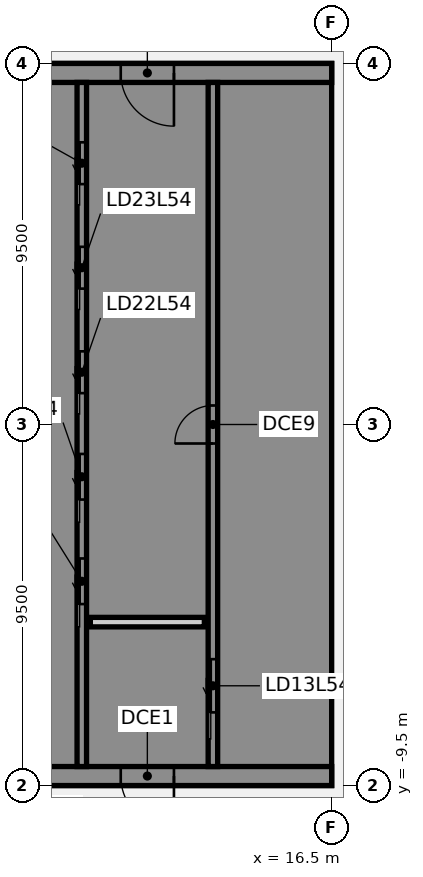
"""IFC4 building model, lengths in metres.
Left out: names, types, materials, properties, quantities, classifications, styles, units other than length and angle.
Written with IfcOpenShell. Run it as: python <this file> out.ifc"""

import sys

from ifc_helpers import new_model, si_unit, direction, frame, frame_2d, origin, place, context, subcontext, project, spatial, polyline, rectangle, outline, extrude, element, fill, save


model = new_model("IFC4")
c1 = context("Model", 3, precision=1e-05, world=origin(), true_north=direction((0.0, 1.0)))
c2 = subcontext(c1, "Body", "Model", "MODEL_VIEW")
j1 = project(units=[si_unit("LENGTHUNIT", "METRE"), si_unit("PLANEANGLEUNIT", "RADIAN")], contexts=[c1])
p1 = place(None, origin())
s1 = spatial("IfcSite", under=j1, at=p1, CompositionType="ELEMENT")
p2 = place(p1, origin())
s2 = spatial("IfcBuilding", under=s1, at=p2, CompositionType="ELEMENT")
p3 = place(p2, frame((0.0, 0.0, 214.9)))
s3 = spatial("IfcBuildingStorey", under=s2, at=p3, CompositionType="ELEMENT", Elevation=214.9)
p4 = place(p3, frame((16.5, -9.25, 0.0), z_axis=(0.0, 0.0, 1.0), x_axis=(-1.0, 0.0, 0.0)))
e1 = element("IfcWall", 1, at=p4, inside=s3, PredefinedType="SHEAR", context=c2, shape_type="SweptSolid", body=[
    extrude(rectangle(XDim=13.0, YDim=0.5, at=frame_2d((6.5, 0.0))), origin(), (0.0, 0.0, 1.0), 4.86),
])
p5 = place(p4, frame((4.15, 0.0, 0.0)))
e2 = element("IfcOpeningElement", 2, at=p5, cuts=e1, PredefinedType="OPENING", context=c2, shape_type="SweptSolid", body=[
    extrude(rectangle(XDim=1.4, YDim=2.1, at=frame_2d((0.7, 1.05))), frame((0.0, 0.26, 0.0), z_axis=(0.0, -1.0, 0.0), x_axis=(1.0, 0.0, 0.0)), (0.0, 0.0, 1.0), 0.52),
])
p6 = place(p4, frame((10.125, 0.0, 0.0)))
e3 = element("IfcOpeningElement", 3, at=p6, cuts=e1, PredefinedType="OPENING", context=c2, shape_type="SweptSolid", body=[
    extrude(rectangle(XDim=1.4, YDim=2.1, at=frame_2d((0.7, 1.05))), frame((0.0, 0.26, 0.0), z_axis=(0.0, -1.0, 0.0), x_axis=(1.0, 0.0, 0.0)), (0.0, 0.0, 1.0), 0.52),
])
p7 = place(p3, origin())
e4 = element("IfcWall", 4, at=p7, inside=s3, PredefinedType="SHEAR", context=c2, shape_type="SweptSolid", body=[
    extrude(outline(polyline([(13.5, -8.125), (13.5, -9.0), (16.0, -9.0), (16.5, -9.0), (16.5, 9.0), (16.0, 9.0), (13.5, 9.0), (13.5, 8.125), (16.0, 8.125), (16.0, 5.625), (13.5, 5.625), (13.5, 5.375), (16.0, 5.375), (16.0, -5.375), (13.5, -5.375), (13.5, -5.625), (16.0, -5.625), (16.0, -8.125), (13.5, -8.125)])), origin(), (0.0, 0.0, 1.0), 4.86),
])
p8 = place(p3, frame((16.5, 9.25, 0.0), z_axis=(0.0, 0.0, 1.0), x_axis=(-1.0, 0.0, 0.0)))
e5 = element("IfcWall", 5, at=p8, inside=s3, PredefinedType="SHEAR", context=c2, shape_type="SweptSolid", body=[
    extrude(rectangle(XDim=13.0, YDim=0.5, at=frame_2d((6.5, 0.0))), origin(), (0.0, 0.0, 1.0), 4.86),
])
p9 = place(p8, frame((4.15, 0.0, 0.0)))
e6 = element("IfcOpeningElement", 6, at=p9, cuts=e5, PredefinedType="OPENING", context=c2, shape_type="SweptSolid", body=[
    extrude(rectangle(XDim=1.4, YDim=2.1, at=frame_2d((0.7, 1.05))), frame((0.0, 0.26, 0.0), z_axis=(0.0, -1.0, 0.0), x_axis=(1.0, 0.0, 0.0)), (0.0, 0.0, 1.0), 0.52),
])
p10 = place(p3, origin())
e7 = element("IfcWall", 7, at=p10, inside=s3, PredefinedType="SHEAR", context=c2, shape_type="SweptSolid", body=[
    extrude(outline(polyline([(9.8, -5.375), (7.5, -5.375), (7.5, -2.875), (9.8, -2.875), (9.8, -2.625), (7.5, -2.625), (7.5, -0.125), (9.8, -0.125), (9.8, 0.125), (7.5, 0.125), (7.5, 2.625), (9.8, 2.625), (9.8, 2.875), (7.5, 2.875), (7.5, 5.375), (9.8, 5.375), (9.8, 5.625), (7.5, 5.625), (7.5, 8.125), (9.8, 8.125), (9.8, 9.0), (7.5, 9.0), (7.25, 9.0), (7.25, -5.625), (7.5, -5.625), (9.8, -5.625), (9.8, -5.375)])), origin(), (0.0, 0.0, 1.0), 4.86),
])
p11 = place(p3, origin())
e8 = element("IfcWall", 8, at=p11, inside=s3, PredefinedType="SHEAR", context=c2, shape_type="SweptSolid", body=[
    extrude(outline(polyline([(7.5, -8.125), (7.5, -9.0), (9.8, -9.0), (9.8, -8.125), (9.8, -5.625), (9.55, -5.625), (9.55, -8.125), (7.5, -8.125)])), origin(), (0.0, 0.0, 1.0), 4.86),
])
p12 = place(p3, frame((13.375, -9.0, 0.0), z_axis=(0.0, 0.0, 1.0), x_axis=(0.0, 1.0, 0.0)))
e9 = element("IfcWall", 9, at=p12, inside=s3, PredefinedType="SHEAR", context=c2, shape_type="SweptSolid", body=[
    extrude(rectangle(XDim=18.0, YDim=0.25, at=frame_2d((9.0, 0.0))), origin(), (0.0, 0.0, 1.0), 4.86),
])
p13 = place(p12, frame((1.425, 0.0, 0.0)))
e10 = element("IfcOpeningElement", 10, at=p13, cuts=e9, PredefinedType="OPENING", context=c2, shape_type="SweptSolid", body=[
    extrude(rectangle(XDim=1.4, YDim=2.1, at=frame_2d((0.7, 1.05))), frame((0.0, 0.135, 0.0), z_axis=(0.0, -1.0, 0.0), x_axis=(1.0, 0.0, 0.0)), (0.0, 0.0, 1.0), 0.27),
])
p14 = place(p12, frame((8.5, 0.0, 0.0)))
e11 = element("IfcOpeningElement", 11, at=p14, cuts=e9, PredefinedType="OPENING", context=c2, shape_type="SweptSolid", body=[
    extrude(rectangle(XDim=1.0, YDim=2.1, at=frame_2d((0.5, 1.05))), frame((0.0, 0.135, 0.0), z_axis=(0.0, -1.0, 0.0), x_axis=(1.0, 0.0, 0.0)), (0.0, 0.0, 1.0), 0.27),
])
p15 = place(p3, frame((9.925, -9.0, 0.0), z_axis=(0.0, 0.0, 1.0), x_axis=(0.0, 1.0, 0.0)))
e12 = element("IfcWall", 12, at=p15, inside=s3, PredefinedType="SHEAR", context=c2, shape_type="SweptSolid", body=[
    extrude(rectangle(XDim=18.0, YDim=0.25, at=frame_2d((9.0, 0.0))), origin(), (0.0, 0.0, 1.0), 4.86),
])
p16 = place(p15, frame((4.275, 0.0, 0.0)))
e13 = element("IfcOpeningElement", 13, at=p16, cuts=e12, PredefinedType="OPENING", context=c2, shape_type="SweptSolid", body=[
    extrude(rectangle(XDim=1.2, YDim=2.1, at=frame_2d((0.6, 1.05))), frame((0.0, 0.135, 0.0), z_axis=(0.0, -1.0, 0.0), x_axis=(1.0, 0.0, 0.0)), (0.0, 0.0, 1.0), 0.27),
])
p17 = place(p15, frame((7.025, 0.0, 0.0)))
e14 = element("IfcOpeningElement", 14, at=p17, cuts=e12, PredefinedType="OPENING", context=c2, shape_type="SweptSolid", body=[
    extrude(rectangle(XDim=1.2, YDim=2.1, at=frame_2d((0.6, 1.05))), frame((0.0, 0.135, 0.0), z_axis=(0.0, -1.0, 0.0), x_axis=(1.0, 0.0, 0.0)), (0.0, 0.0, 1.0), 0.27),
])
p18 = place(p15, frame((9.825, 0.0, 0.0)))
e15 = element("IfcOpeningElement", 15, at=p18, cuts=e12, PredefinedType="OPENING", context=c2, shape_type="SweptSolid", body=[
    extrude(rectangle(XDim=1.1, YDim=2.1, at=frame_2d((0.55, 1.05))), frame((0.0, 0.135, 0.0), z_axis=(0.0, -1.0, 0.0), x_axis=(1.0, 0.0, 0.0)), (0.0, 0.0, 1.0), 0.27),
])
p19 = place(p15, frame((12.575, 0.0, 0.0)))
e16 = element("IfcOpeningElement", 16, at=p19, cuts=e12, PredefinedType="OPENING", context=c2, shape_type="SweptSolid", body=[
    extrude(rectangle(XDim=1.1, YDim=2.1, at=frame_2d((0.55, 1.05))), frame((0.0, 0.135, 0.0), z_axis=(0.0, -1.0, 0.0), x_axis=(1.0, 0.0, 0.0)), (0.0, 0.0, 1.0), 0.27),
])
p20 = place(p15, frame((15.325, 0.0, 0.0)))
e17 = element("IfcOpeningElement", 17, at=p20, cuts=e12, PredefinedType="OPENING", context=c2, shape_type="SweptSolid", body=[
    extrude(rectangle(XDim=1.1, YDim=2.1, at=frame_2d((0.55, 1.05))), frame((0.0, 0.135, 0.0), z_axis=(0.0, -1.0, 0.0), x_axis=(1.0, 0.0, 0.0)), (0.0, 0.0, 1.0), 0.27),
])
p21 = place(p3, frame((13.15, -5.2, 0.0), z_axis=(0.0, 0.0, 1.0), x_axis=(-1.0, 0.0, 0.0)))
e18 = element("IfcWall", 18, at=p21, inside=s3, PredefinedType="PARTITIONING", context=c2, shape_type="SweptSolid", body=[
    extrude(rectangle(XDim=3.0, YDim=0.25, at=frame_2d((1.5, 0.0))), origin(), (0.0, 0.0, 1.0), 4.86),
])
p22 = place(p5, origin())
e19 = element("IfcDoor", 19, at=p22, inside=s3, OperationType="SINGLE_SWING_LEFT", PredefinedType="DOOR", context=c2, shape_type="SweptSolid", body=[
    extrude(rectangle(XDim=1.4, YDim=2.1, at=frame_2d((0.7, 1.05))), frame((0.0, 0.025, 0.0), z_axis=(0.0, -1.0, 0.0), x_axis=(1.0, 0.0, 0.0)), (0.0, 0.0, 1.0), 0.05),
])
fill(e2, e19)
p23 = place(p13, origin())
e20 = element("IfcDoor", 20, at=p23, inside=s3, OperationType="SLIDING_TO_LEFT", PredefinedType="DOOR", context=c2, shape_type="SweptSolid", body=[
    extrude(rectangle(XDim=1.4, YDim=2.1, at=frame_2d((0.7, 1.05))), frame((0.0, 0.025, 0.0), z_axis=(0.0, -1.0, 0.0), x_axis=(1.0, 0.0, 0.0)), (0.0, 0.0, 1.0), 0.05),
])
fill(e10, e20)
p24 = place(p16, origin())
e21 = element("IfcDoor", 21, at=p24, inside=s3, OperationType="SLIDING_TO_LEFT", PredefinedType="DOOR", context=c2, shape_type="SweptSolid", body=[
    extrude(rectangle(XDim=1.2, YDim=2.1, at=frame_2d((0.6, 1.05))), frame((0.0, 0.025, 0.0), z_axis=(0.0, -1.0, 0.0), x_axis=(1.0, 0.0, 0.0)), (0.0, 0.0, 1.0), 0.05),
])
fill(e13, e21)
p25 = place(p17, origin())
e22 = element("IfcDoor", 22, at=p25, inside=s3, OperationType="SLIDING_TO_LEFT", PredefinedType="DOOR", context=c2, shape_type="SweptSolid", body=[
    extrude(rectangle(XDim=1.2, YDim=2.1, at=frame_2d((0.6, 1.05))), frame((0.0, 0.025, 0.0), z_axis=(0.0, -1.0, 0.0), x_axis=(1.0, 0.0, 0.0)), (0.0, 0.0, 1.0), 0.05),
])
fill(e14, e22)
p26 = place(p18, origin())
e23 = element("IfcDoor", 23, at=p26, inside=s3, OperationType="SLIDING_TO_LEFT", PredefinedType="DOOR", context=c2, shape_type="SweptSolid", body=[
    extrude(rectangle(XDim=1.1, YDim=2.1, at=frame_2d((0.55, 1.05))), frame((0.0, 0.025, 0.0), z_axis=(0.0, -1.0, 0.0), x_axis=(1.0, 0.0, 0.0)), (0.0, 0.0, 1.0), 0.05),
])
fill(e15, e23)
p27 = place(p19, origin())
e24 = element("IfcDoor", 24, at=p27, inside=s3, OperationType="SLIDING_TO_LEFT", PredefinedType="DOOR", context=c2, shape_type="SweptSolid", body=[
    extrude(rectangle(XDim=1.1, YDim=2.1, at=frame_2d((0.55, 1.05))), frame((0.0, 0.025, 0.0), z_axis=(0.0, -1.0, 0.0), x_axis=(1.0, 0.0, 0.0)), (0.0, 0.0, 1.0), 0.05),
])
fill(e16, e24)
p28 = place(p20, origin())
e25 = element("IfcDoor", 25, at=p28, inside=s3, OperationType="SLIDING_TO_LEFT", PredefinedType="DOOR", context=c2, shape_type="SweptSolid", body=[
    extrude(rectangle(XDim=1.1, YDim=2.1, at=frame_2d((0.55, 1.05))), frame((0.0, 0.025, 0.0), z_axis=(0.0, -1.0, 0.0), x_axis=(1.0, 0.0, 0.0)), (0.0, 0.0, 1.0), 0.05),
])
fill(e17, e25)
p29 = place(p9, origin())
e26 = element("IfcDoor", 26, at=p29, inside=s3, OperationType="SINGLE_SWING_LEFT", PredefinedType="DOOR", context=c2, shape_type="SweptSolid", body=[
    extrude(rectangle(XDim=1.4, YDim=2.1, at=frame_2d((0.7, 1.05))), frame((0.0, 0.025, 0.0), z_axis=(0.0, -1.0, 0.0), x_axis=(1.0, 0.0, 0.0)), (0.0, 0.0, 1.0), 0.05),
])
fill(e6, e26)
p30 = place(p14, origin())
e27 = element("IfcDoor", 27, at=p30, inside=s3, OperationType="SINGLE_SWING_LEFT", PredefinedType="DOOR", context=c2, shape_type="SweptSolid", body=[
    extrude(rectangle(XDim=1.0, YDim=2.1, at=frame_2d((0.5, 1.05))), frame((0.0, 0.025, 0.0), z_axis=(0.0, -1.0, 0.0), x_axis=(1.0, 0.0, 0.0)), (0.0, 0.0, 1.0), 0.05),
])
fill(e11, e27)
save(model, sys.argv[1])
